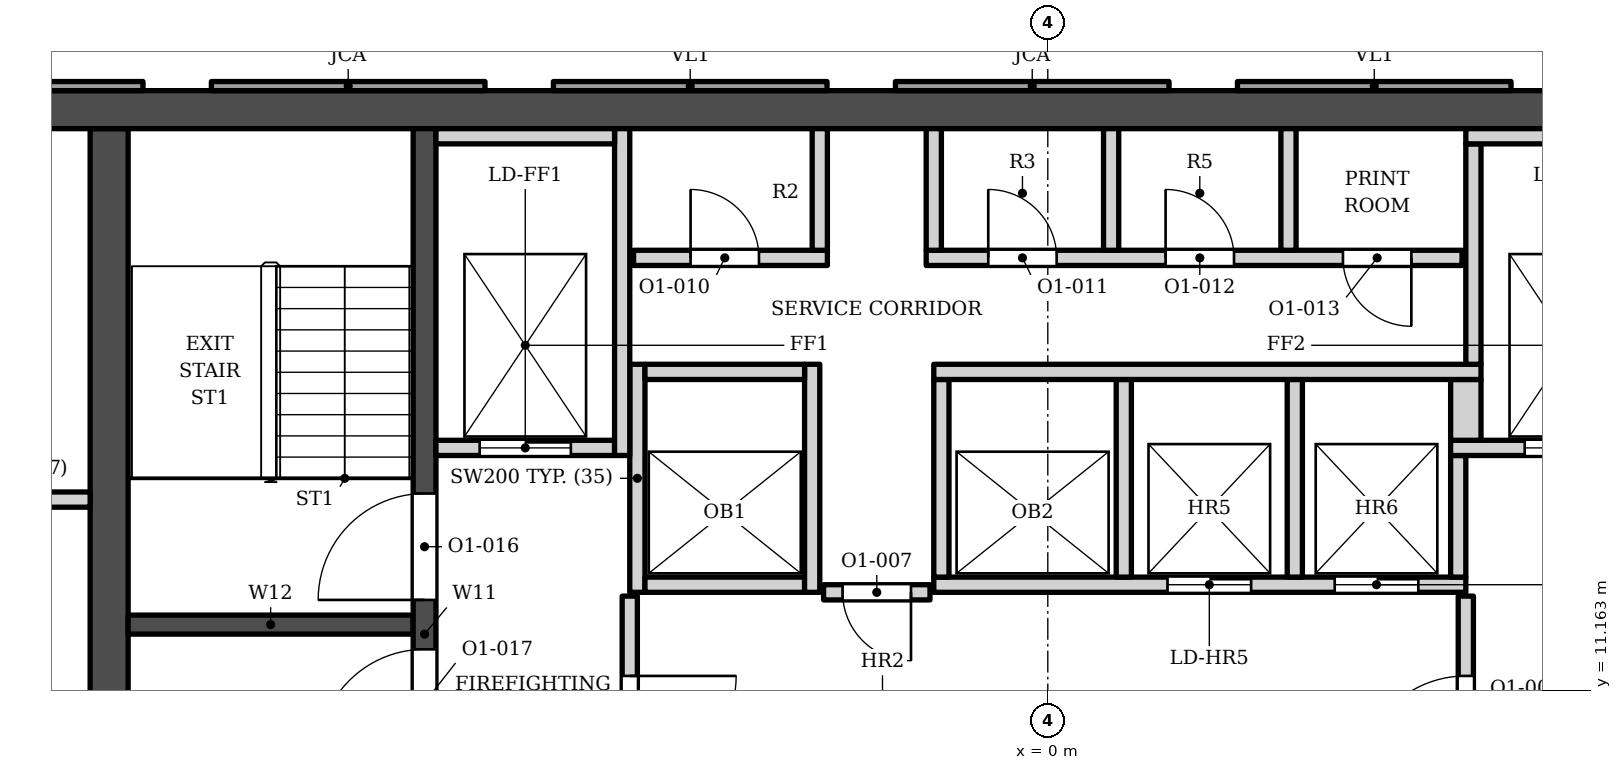
"""IFC4 building model, lengths in metres.
Left out: names, types, materials, properties, quantities, classifications, styles, units other than length and angle.
Written with IfcOpenShell. Run it as: python <this file> out.ifc"""

import sys

from ifc_helpers import new_model, si_unit, direction, frame, frame_2d, origin, place, context, subcontext, project, spatial, polyline, rectangle, outline, extrude, element, fill, save


model = new_model("IFC4")
c1 = context("Model", 3, precision=1e-05, world=origin(), true_north=direction((0.0, 1.0)))
c2 = subcontext(c1, "Body", "Model", "MODEL_VIEW")
j1 = project(units=[si_unit("LENGTHUNIT", "METRE"), si_unit("PLANEANGLEUNIT", "RADIAN")], contexts=[c1])
p1 = place(None, origin())
s1 = spatial("IfcSite", under=j1, at=p1, CompositionType="ELEMENT")
p2 = place(p1, origin())
s2 = spatial("IfcBuilding", under=s1, at=p2, CompositionType="ELEMENT")
p3 = place(p2, frame((0.0, 0.0, 144.6)))
s3 = spatial("IfcBuildingStorey", under=s2, at=p3, CompositionType="ELEMENT", Elevation=144.6)
p4 = place(p3, frame((-15.1, 18.802, 0.0), z_axis=(0.0, 0.0, 1.0), x_axis=(1.0, 0.0, 0.0)))
e1 = element("IfcWall", 1, at=p4, inside=s3, PredefinedType="SHEAR", context=c2, shape_type="SweptSolid", body=[
    extrude(rectangle(XDim=30.2, YDim=0.5, at=frame_2d((15.1, 0.0))), origin(), (0.0, 0.0, 1.0), 3.9),
])
p5 = place(p3, frame((-12.35, 5.253, 0.0), z_axis=(0.0, 0.0, 1.0), x_axis=(0.0, 1.0, 0.0)))
e2 = element("IfcWall", 2, at=p5, inside=s3, PredefinedType="SHEAR", context=c2, shape_type="SweptSolid", body=[
    extrude(rectangle(XDim=13.3, YDim=0.5, at=frame_2d((6.65, 0.0))), origin(), (0.0, 0.0, 1.0), 3.9),
])
p6 = place(p3, frame((-8.2, 5.253, 0.0), z_axis=(0.0, 0.0, 1.0), x_axis=(0.0, 1.0, 0.0)))
e3 = element("IfcWall", 3, at=p6, inside=s3, PredefinedType="SHEAR", context=c2, shape_type="SweptSolid", body=[
    extrude(rectangle(XDim=13.3, YDim=0.3, at=frame_2d((6.65, 0.0))), origin(), (0.0, 0.0, 1.0), 3.9),
])
p7 = place(p6, frame((7.1, 0.0, 0.0)))
e4 = element("IfcOpeningElement", 4, at=p7, cuts=e3, PredefinedType="OPENING", context=c2, shape_type="SweptSolid", body=[
    extrude(rectangle(XDim=1.4, YDim=2.1, at=frame_2d((0.7, 1.05))), frame((0.0, 0.16, 0.0), z_axis=(0.0, -1.0, 0.0), x_axis=(1.0, 0.0, 0.0)), (0.0, 0.0, 1.0), 0.32),
])
p8 = place(p6, frame((5.05, 0.0, 0.0)))
e5 = element("IfcOpeningElement", 5, at=p8, cuts=e3, PredefinedType="OPENING", context=c2, shape_type="SweptSolid", body=[
    extrude(rectangle(XDim=1.4, YDim=2.1, at=frame_2d((0.7, 1.05))), frame((0.0, 0.16, 0.0), z_axis=(0.0, -1.0, 0.0), x_axis=(1.0, 0.0, 0.0)), (0.0, 0.0, 1.0), 0.32),
])
p9 = place(p3, frame((-12.1, 12.028, 0.0), z_axis=(0.0, 0.0, 1.0), x_axis=(1.0, 0.0, 0.0)))
e6 = element("IfcWall", 6, at=p9, inside=s3, PredefinedType="SHEAR", context=c2, shape_type="SweptSolid", body=[
    extrude(rectangle(XDim=3.75, YDim=0.25, at=frame_2d((1.875, 0.0))), origin(), (0.0, 0.0, 1.0), 3.9),
])
p10 = place(p3, origin())
e7 = element("IfcWall", 7, at=p10, inside=s3, PredefinedType="ELEMENTEDWALL", context=c2, shape_type="SweptSolid", body=[
    extrude(outline(polyline([(2.495, 19.173), (2.495, 19.052), (6.095, 19.052), (6.095, 19.173), (2.495, 19.173)])), origin(), (0.0, 0.0, 1.0), 3.0),
])
p11 = place(p3, origin())
e8 = element("IfcWall", 8, at=p11, inside=s3, PredefinedType="SOLIDWALL", context=c2, shape_type="SweptSolid", body=[
    extrude(outline(polyline([(-2.005, 19.173), (-2.005, 19.052), (1.595, 19.052), (1.595, 19.173), (-2.005, 19.173)])), origin(), (0.0, 0.0, 1.0), 3.0),
])
p12 = place(p3, origin())
e9 = element("IfcWall", 9, at=p12, inside=s3, PredefinedType="ELEMENTEDWALL", context=c2, shape_type="SweptSolid", body=[
    extrude(outline(polyline([(-6.505, 19.173), (-6.505, 19.052), (-2.905, 19.052), (-2.905, 19.173), (-6.505, 19.173)])), origin(), (0.0, 0.0, 1.0), 3.0),
])
p13 = place(p3, origin())
e10 = element("IfcWall", 10, at=p13, inside=s3, PredefinedType="SOLIDWALL", context=c2, shape_type="SweptSolid", body=[
    extrude(outline(polyline([(-11.005, 19.173), (-11.005, 19.052), (-7.405, 19.052), (-7.405, 19.173), (-11.005, 19.173)])), origin(), (0.0, 0.0, 1.0), 3.0),
])
p14 = place(p3, origin())
e11 = element("IfcWall", 11, at=p14, inside=s3, PredefinedType="ELEMENTEDWALL", context=c2, shape_type="SweptSolid", body=[
    extrude(outline(polyline([(-11.905, 19.052), (-11.905, 19.173), (-15.503, 19.173), (-15.503, 19.052), (-11.905, 19.052)])), origin(), (0.0, 0.0, 1.0), 3.0),
])
p15 = place(p3, frame((-5.5, 9.103, 0.0), z_axis=(0.0, 0.0, 1.0), x_axis=(0.0, 1.0, 0.0)))
e12 = element("IfcWall", 12, at=p15, inside=s3, PredefinedType="SOLIDWALL", context=c2, shape_type="SweptSolid", body=[
    extrude(rectangle(XDim=3.3, YDim=0.2, at=frame_2d((1.65, 0.0))), origin(), (0.0, 0.0, 1.0), 3.73),
])
p16 = place(p15, frame((0.85, 0.0, 0.0)))
e13 = element("IfcOpeningElement", 13, at=p16, cuts=e12, PredefinedType="OPENING", context=c2, shape_type="SweptSolid", body=[
    extrude(rectangle(XDim=1.4, YDim=2.1, at=frame_2d((0.7, 1.05))), frame((0.0, 0.11, 0.0), z_axis=(0.0, -1.0, 0.0), x_axis=(1.0, 0.0, 0.0)), (0.0, 0.0, 1.0), 0.22),
])
p17 = place(p3, frame((5.5, 9.103, 0.0), z_axis=(0.0, 0.0, 1.0), x_axis=(0.0, 1.0, 0.0)))
e14 = element("IfcWall", 14, at=p17, inside=s3, PredefinedType="SOLIDWALL", context=c2, shape_type="SweptSolid", body=[
    extrude(rectangle(XDim=3.3, YDim=0.2, at=frame_2d((1.65, 0.0))), origin(), (0.0, 0.0, 1.0), 3.73),
])
p18 = place(p17, frame((0.85, 0.0, 0.0)))
e15 = element("IfcOpeningElement", 15, at=p18, cuts=e14, PredefinedType="OPENING", context=c2, shape_type="SweptSolid", body=[
    extrude(rectangle(XDim=1.4, YDim=2.1, at=frame_2d((0.7, 1.05))), frame((0.0, 0.11, 0.0), z_axis=(0.0, -1.0, 0.0), x_axis=(1.0, 0.0, 0.0)), (0.0, 0.0, 1.0), 0.22),
])
p19 = place(p3, frame((-2.95, 12.453, 0.0), z_axis=(0.0, 0.0, 1.0), x_axis=(1.0, 0.0, 0.0)))
e16 = element("IfcWall", 16, at=p19, inside=s3, PredefinedType="SOLIDWALL", context=c2, shape_type="SweptSolid", body=[
    extrude(rectangle(XDim=1.4, YDim=0.2, at=frame_2d((0.7, 0.0))), origin(), (0.0, 0.0, 1.0), 3.73),
])
p20 = place(p19, frame((0.25, 0.0, 0.0)))
e17 = element("IfcOpeningElement", 17, at=p20, cuts=e16, PredefinedType="OPENING", context=c2, shape_type="SweptSolid", body=[
    extrude(rectangle(XDim=0.9, YDim=2.1, at=frame_2d((0.45, 1.05))), frame((0.0, 0.11, 0.0), z_axis=(0.0, -1.0, 0.0), x_axis=(1.0, 0.0, 0.0)), (0.0, 0.0, 1.0), 0.22),
])
p21 = place(p3, frame((-5.4, 12.453, 0.0), z_axis=(0.0, 0.0, 1.0), x_axis=(0.0, 1.0, 0.0)))
e18 = element("IfcWall", 18, at=p21, inside=s3, PredefinedType="SOLIDWALL", context=c2, shape_type="SweptSolid", body=[
    extrude(rectangle(XDim=3.0, YDim=0.2, at=frame_2d((1.5, 0.0))), origin(), (0.0, 0.0, 1.0), 3.73),
])
p22 = place(p3, frame((-5.3, 12.552, 0.0), z_axis=(0.0, 0.0, 1.0), x_axis=(1.0, 0.0, 0.0)))
e19 = element("IfcWall", 19, at=p22, inside=s3, PredefinedType="SOLIDWALL", context=c2, shape_type="SweptSolid", body=[
    extrude(rectangle(XDim=2.1, YDim=0.2, at=frame_2d((1.05, 0.0))), origin(), (0.0, 0.0, 1.0), 3.73),
])
p23 = place(p3, frame((-3.1, 12.453, 0.0), z_axis=(0.0, 0.0, 1.0), x_axis=(0.0, 1.0, 0.0)))
e20 = element("IfcWall", 20, at=p23, inside=s3, PredefinedType="SOLIDWALL", context=c2, shape_type="SweptSolid", body=[
    extrude(rectangle(XDim=3.0, YDim=0.2, at=frame_2d((1.5, 0.0))), origin(), (0.0, 0.0, 1.0), 3.73),
])
p24 = place(p3, frame((-1.5, 12.552, 0.0), z_axis=(0.0, 0.0, 1.0), x_axis=(1.0, 0.0, 0.0)))
e21 = element("IfcWall", 21, at=p24, inside=s3, PredefinedType="SOLIDWALL", context=c2, shape_type="SweptSolid", body=[
    extrude(rectangle(XDim=7.0, YDim=0.2, at=frame_2d((3.5, 0.0))), origin(), (0.0, 0.0, 1.0), 3.73),
])
p25 = place(p24, frame((3.075, 0.0, 0.0)))
e22 = element("IfcOpeningElement", 22, at=p25, cuts=e21, PredefinedType="OPENING", context=c2, shape_type="SweptSolid", body=[
    extrude(rectangle(XDim=1.1, YDim=2.1, at=frame_2d((0.55, 1.05))), frame((0.0, 0.11, 0.0), z_axis=(0.0, -1.0, 0.0), x_axis=(1.0, 0.0, 0.0)), (0.0, 0.0, 1.0), 0.22),
])
p26 = place(p24, frame((5.275, 0.0, 0.0)))
e23 = element("IfcOpeningElement", 23, at=p26, cuts=e21, PredefinedType="OPENING", context=c2, shape_type="SweptSolid", body=[
    extrude(rectangle(XDim=1.1, YDim=2.1, at=frame_2d((0.55, 1.05))), frame((0.0, 0.11, 0.0), z_axis=(0.0, -1.0, 0.0), x_axis=(1.0, 0.0, 0.0)), (0.0, 0.0, 1.0), 0.22),
])
for number, where, z_axis, x_axis in (
    (24, (-1.4, 12.653, 0.0), (0.0, 0.0, 1.0), (0.0, 1.0, 0.0)),
    (25, (1.0, 12.653, 0.0), (0.0, 0.0, 1.0), (0.0, 1.0, 0.0)),
    (26, (3.25, 12.653, 0.0), (0.0, 0.0, 1.0), (0.0, 1.0, 0.0)),
):
    element("IfcWall", number, at=place(p3, frame(where, z_axis=z_axis, x_axis=x_axis)), inside=s3, PredefinedType="SOLIDWALL", context=c2, shape_type="SweptSolid", body=[
        extrude(rectangle(XDim=2.6, YDim=0.2, at=frame_2d((1.3, 0.0))), origin(), (0.0, 0.0, 1.0), 3.73),
    ])
p27 = place(p3, frame((5.4, 12.653, 0.0), z_axis=(0.0, 0.0, 1.0), x_axis=(0.0, 1.0, 0.0)))
e27 = element("IfcWall", 27, at=p27, inside=s3, PredefinedType="SOLIDWALL", context=c2, shape_type="SweptSolid", body=[
    extrude(rectangle(XDim=1.6, YDim=0.2, at=frame_2d((0.8, 0.0))), origin(), (0.0, 0.0, 1.0), 3.73),
])
p28 = place(p3, frame((-15.1, 13.673, 0.0), z_axis=(0.0, 0.0, 1.0), x_axis=(1.0, 0.0, 0.0)))
e28 = element("IfcWall", 28, at=p28, inside=s3, PredefinedType="PARTITIONING", context=c2, shape_type="SweptSolid", body=[
    extrude(rectangle(XDim=2.5, YDim=0.2, at=frame_2d((1.25, 0.0))), origin(), (0.0, 0.0, 1.0), 3.73),
])
p29 = place(p3, frame((-8.05, 14.353, 0.0), z_axis=(0.0, 0.0, 1.0), x_axis=(1.0, 0.0, 0.0)))
e29 = element("IfcWall", 29, at=p29, inside=s3, PredefinedType="SOLIDWALL", context=c2, shape_type="SweptSolid", body=[
    extrude(rectangle(XDim=2.35, YDim=0.2, at=frame_2d((1.175, 0.0))), origin(), (0.0, 0.0, 1.0), 3.73),
])
p30 = place(p29, frame((0.575, 0.0, 0.0)))
e30 = element("IfcOpeningElement", 30, at=p30, cuts=e29, PredefinedType="OPENING", context=c2, shape_type="SweptSolid", body=[
    extrude(rectangle(XDim=1.2, YDim=2.1, at=frame_2d((0.6, 1.05))), frame((0.0, 0.11, 0.0), z_axis=(0.0, -1.0, 0.0), x_axis=(1.0, 0.0, 0.0)), (0.0, 0.0, 1.0), 0.22),
])
p31 = place(p3, frame((-5.6, 14.253, 0.0), z_axis=(0.0, 0.0, 1.0), x_axis=(0.0, 1.0, 0.0)))
e31 = element("IfcWall", 31, at=p31, inside=s3, PredefinedType="SOLIDWALL", context=c2, shape_type="SweptSolid", body=[
    extrude(rectangle(XDim=4.3, YDim=0.2, at=frame_2d((2.15, 0.0))), origin(), (0.0, 0.0, 1.0), 3.73),
])
p32 = place(p3, frame((5.3, 14.353, 0.0), z_axis=(0.0, 0.0, 1.0), x_axis=(1.0, 0.0, 0.0)))
e32 = element("IfcWall", 32, at=p32, inside=s3, PredefinedType="SOLIDWALL", context=c2, shape_type="SweptSolid", body=[
    extrude(rectangle(XDim=2.75, YDim=0.2, at=frame_2d((1.375, 0.0))), origin(), (0.0, 0.0, 1.0), 3.73),
])
p33 = place(p32, frame((0.975, 0.0, 0.0)))
e33 = element("IfcOpeningElement", 33, at=p33, cuts=e32, PredefinedType="OPENING", context=c2, shape_type="SweptSolid", body=[
    extrude(rectangle(XDim=1.2, YDim=2.1, at=frame_2d((0.6, 1.05))), frame((0.0, 0.11, 0.0), z_axis=(0.0, -1.0, 0.0), x_axis=(1.0, 0.0, 0.0)), (0.0, 0.0, 1.0), 0.22),
])
p34 = place(p3, frame((5.5, 14.453, 0.0), z_axis=(0.0, 0.0, 1.0), x_axis=(0.0, 1.0, 0.0)))
e34 = element("IfcWall", 34, at=p34, inside=s3, PredefinedType="SOLIDWALL", context=c2, shape_type="SweptSolid", body=[
    extrude(rectangle(XDim=0.8, YDim=0.4, at=frame_2d((0.4, 0.0))), origin(), (0.0, 0.0, 1.0), 3.73),
])
p35 = place(p3, frame((-5.3, 15.353, 0.0), z_axis=(0.0, 0.0, 1.0), x_axis=(1.0, 0.0, 0.0)))
e35 = element("IfcWall", 35, at=p35, inside=s3, PredefinedType="SOLIDWALL", context=c2, shape_type="SweptSolid", body=[
    extrude(rectangle(XDim=2.1, YDim=0.2, at=frame_2d((1.05, 0.0))), origin(), (0.0, 0.0, 1.0), 3.73),
])
p36 = place(p3, frame((-1.5, 15.353, 0.0), z_axis=(0.0, 0.0, 1.0), x_axis=(1.0, 0.0, 0.0)))
e36 = element("IfcWall", 36, at=p36, inside=s3, PredefinedType="SOLIDWALL", context=c2, shape_type="SweptSolid", body=[
    extrude(rectangle(XDim=7.2, YDim=0.2, at=frame_2d((3.6, 0.0))), origin(), (0.0, 0.0, 1.0), 3.73),
])
p37 = place(p3, frame((5.6, 15.453, 0.0), z_axis=(0.0, 0.0, 1.0), x_axis=(0.0, 1.0, 0.0)))
e37 = element("IfcWall", 37, at=p37, inside=s3, PredefinedType="SOLIDWALL", context=c2, shape_type="SweptSolid", body=[
    extrude(rectangle(XDim=2.9, YDim=0.2, at=frame_2d((1.45, 0.0))), origin(), (0.0, 0.0, 1.0), 3.73),
])
p38 = place(p3, frame((-5.45, 16.853, 0.0), z_axis=(0.0, 0.0, 1.0), x_axis=(1.0, 0.0, 0.0)))
e38 = element("IfcWall", 38, at=p38, inside=s3, PredefinedType="SOLIDWALL", context=c2, shape_type="SweptSolid", body=[
    extrude(rectangle(XDim=2.55, YDim=0.2, at=frame_2d((1.275, 0.0))), origin(), (0.0, 0.0, 1.0), 3.73),
])
p39 = place(p38, frame((0.75, 0.0, 0.0)))
e39 = element("IfcOpeningElement", 39, at=p39, cuts=e38, PredefinedType="OPENING", context=c2, shape_type="SweptSolid", body=[
    extrude(rectangle(XDim=0.9, YDim=2.1, at=frame_2d((0.45, 1.05))), frame((0.0, 0.11, 0.0), z_axis=(0.0, -1.0, 0.0), x_axis=(1.0, 0.0, 0.0)), (0.0, 0.0, 1.0), 0.22),
])
p40 = place(p3, frame((-1.6, 16.853, 0.0), z_axis=(0.0, 0.0, 1.0), x_axis=(1.0, 0.0, 0.0)))
e40 = element("IfcWall", 40, at=p40, inside=s3, PredefinedType="SOLIDWALL", context=c2, shape_type="SweptSolid", body=[
    extrude(rectangle(XDim=7.05, YDim=0.2, at=frame_2d((3.525, 0.0))), origin(), (0.0, 0.0, 1.0), 3.73),
])
p41 = place(p40, frame((0.817, 0.0, 0.0)))
e41 = element("IfcOpeningElement", 41, at=p41, cuts=e40, PredefinedType="OPENING", context=c2, shape_type="SweptSolid", body=[
    extrude(rectangle(XDim=0.9, YDim=2.1, at=frame_2d((0.45, 1.05))), frame((0.0, 0.11, 0.0), z_axis=(0.0, -1.0, 0.0), x_axis=(1.0, 0.0, 0.0)), (0.0, 0.0, 1.0), 0.22),
])
p42 = place(p40, frame((3.15, 0.0, 0.0)))
e42 = element("IfcOpeningElement", 42, at=p42, cuts=e40, PredefinedType="OPENING", context=c2, shape_type="SweptSolid", body=[
    extrude(rectangle(XDim=0.9, YDim=2.1, at=frame_2d((0.45, 1.05))), frame((0.0, 0.11, 0.0), z_axis=(0.0, -1.0, 0.0), x_axis=(1.0, 0.0, 0.0)), (0.0, 0.0, 1.0), 0.22),
])
p43 = place(p40, frame((5.483, 0.0, 0.0)))
e43 = element("IfcOpeningElement", 43, at=p43, cuts=e40, PredefinedType="OPENING", context=c2, shape_type="SweptSolid", body=[
    extrude(rectangle(XDim=0.9, YDim=2.1, at=frame_2d((0.45, 1.05))), frame((0.0, 0.11, 0.0), z_axis=(0.0, -1.0, 0.0), x_axis=(1.0, 0.0, 0.0)), (0.0, 0.0, 1.0), 0.22),
])
for number, where, z_axis, x_axis in (
    (44, (-3.0, 16.953, 0.0), (0.0, 0.0, 1.0), (0.0, 1.0, 0.0)),
    (45, (-1.5, 16.953, 0.0), (0.0, 0.0, 1.0), (0.0, 1.0, 0.0)),
    (46, (0.833, 16.953, 0.0), (0.0, 0.0, 1.0), (0.0, 1.0, 0.0)),
    (47, (3.167, 16.953, 0.0), (0.0, 0.0, 1.0), (0.0, 1.0, 0.0)),
):
    element("IfcWall", number, at=place(p3, frame(where, z_axis=z_axis, x_axis=x_axis)), inside=s3, PredefinedType="PARTITIONING", context=c2, shape_type="SweptSolid", body=[
        extrude(rectangle(XDim=1.6, YDim=0.2, at=frame_2d((0.8, 0.0))), origin(), (0.0, 0.0, 1.0), 3.73),
    ])
p44 = place(p3, frame((-8.05, 18.453, 0.0), z_axis=(0.0, 0.0, 1.0), x_axis=(1.0, 0.0, 0.0)))
e48 = element("IfcWall", 48, at=p44, inside=s3, PredefinedType="SOLIDWALL", context=c2, shape_type="SweptSolid", body=[
    extrude(rectangle(XDim=2.35, YDim=0.2, at=frame_2d((1.175, 0.0))), origin(), (0.0, 0.0, 1.0), 3.73),
])
p45 = place(p3, frame((5.5, 18.453, 0.0), z_axis=(0.0, 0.0, 1.0), x_axis=(1.0, 0.0, 0.0)))
e49 = element("IfcWall", 49, at=p45, inside=s3, PredefinedType="SOLIDWALL", context=c2, shape_type="SweptSolid", body=[
    extrude(rectangle(XDim=2.55, YDim=0.2, at=frame_2d((1.275, 0.0))), origin(), (0.0, 0.0, 1.0), 3.73),
])
p46 = place(p25, origin())
e50 = element("IfcDoor", 50, at=p46, inside=s3, OperationType="DOUBLE_DOOR_SLIDING", PredefinedType="DOOR", context=c2, shape_type="SweptSolid", body=[
    extrude(rectangle(XDim=1.1, YDim=2.1, at=frame_2d((0.55, 1.05))), frame((0.0, 0.025, 0.0), z_axis=(0.0, -1.0, 0.0), x_axis=(1.0, 0.0, 0.0)), (0.0, 0.0, 1.0), 0.05),
])
fill(e22, e50)
p47 = place(p26, origin())
e51 = element("IfcDoor", 51, at=p47, inside=s3, OperationType="DOUBLE_DOOR_SLIDING", PredefinedType="DOOR", context=c2, shape_type="SweptSolid", body=[
    extrude(rectangle(XDim=1.1, YDim=2.1, at=frame_2d((0.55, 1.05))), frame((0.0, 0.025, 0.0), z_axis=(0.0, -1.0, 0.0), x_axis=(1.0, 0.0, 0.0)), (0.0, 0.0, 1.0), 0.05),
])
fill(e23, e51)
p48 = place(p30, origin())
e52 = element("IfcDoor", 52, at=p48, inside=s3, OperationType="DOUBLE_DOOR_SLIDING", PredefinedType="DOOR", context=c2, shape_type="SweptSolid", body=[
    extrude(rectangle(XDim=1.2, YDim=2.1, at=frame_2d((0.6, 1.05))), frame((0.0, 0.025, 0.0), z_axis=(0.0, -1.0, 0.0), x_axis=(1.0, 0.0, 0.0)), (0.0, 0.0, 1.0), 0.05),
])
fill(e30, e52)
p49 = place(p33, origin())
e53 = element("IfcDoor", 53, at=p49, inside=s3, OperationType="DOUBLE_DOOR_SLIDING", PredefinedType="DOOR", context=c2, shape_type="SweptSolid", body=[
    extrude(rectangle(XDim=1.2, YDim=2.1, at=frame_2d((0.6, 1.05))), frame((0.0, 0.025, 0.0), z_axis=(0.0, -1.0, 0.0), x_axis=(1.0, 0.0, 0.0)), (0.0, 0.0, 1.0), 0.05),
])
fill(e33, e53)
p50 = place(p7, origin())
e54 = element("IfcDoor", 54, at=p50, inside=s3, OperationType="SINGLE_SWING_LEFT", PredefinedType="DOOR", context=c2, shape_type="SweptSolid", body=[
    extrude(rectangle(XDim=1.4, YDim=2.1, at=frame_2d((0.7, 1.05))), frame((0.0, 0.025, 0.0), z_axis=(0.0, -1.0, 0.0), x_axis=(1.0, 0.0, 0.0)), (0.0, 0.0, 1.0), 0.05),
])
fill(e4, e54)
p51 = place(p8, origin())
e55 = element("IfcDoor", 55, at=p51, inside=s3, OperationType="SINGLE_SWING_LEFT", PredefinedType="DOOR", context=c2, shape_type="SweptSolid", body=[
    extrude(rectangle(XDim=1.4, YDim=2.1, at=frame_2d((0.7, 1.05))), frame((0.0, 0.025, 0.0), z_axis=(0.0, -1.0, 0.0), x_axis=(1.0, 0.0, 0.0)), (0.0, 0.0, 1.0), 0.05),
])
fill(e5, e55)
p52 = place(p20, origin())
e56 = element("IfcDoor", 56, at=p52, inside=s3, OperationType="SINGLE_SWING_RIGHT", PredefinedType="DOOR", context=c2, shape_type="SweptSolid", body=[
    extrude(rectangle(XDim=0.9, YDim=2.1, at=frame_2d((0.45, 1.05))), frame((0.0, 0.025, 0.0), z_axis=(0.0, -1.0, 0.0), x_axis=(1.0, 0.0, 0.0)), (0.0, 0.0, 1.0), 0.05),
])
fill(e17, e56)
p53 = place(p16, origin())
e57 = element("IfcDoor", 57, at=p53, inside=s3, OperationType="SINGLE_SWING_RIGHT", PredefinedType="DOOR", context=c2, shape_type="SweptSolid", body=[
    extrude(rectangle(XDim=1.4, YDim=2.1, at=frame_2d((0.7, 1.05))), frame((0.0, 0.025, 0.0), z_axis=(0.0, -1.0, 0.0), x_axis=(1.0, 0.0, 0.0)), (0.0, 0.0, 1.0), 0.05),
])
fill(e13, e57)
p54 = place(p18, origin())
e58 = element("IfcDoor", 58, at=p54, inside=s3, OperationType="SINGLE_SWING_LEFT", PredefinedType="DOOR", context=c2, shape_type="SweptSolid", body=[
    extrude(rectangle(XDim=1.4, YDim=2.1, at=frame_2d((0.7, 1.05))), frame((0.0, 0.025, 0.0), z_axis=(0.0, -1.0, 0.0), x_axis=(1.0, 0.0, 0.0)), (0.0, 0.0, 1.0), 0.05),
])
fill(e15, e58)
p55 = place(p39, origin())
e59 = element("IfcDoor", 59, at=p55, inside=s3, OperationType="SINGLE_SWING_LEFT", PredefinedType="DOOR", context=c2, shape_type="SweptSolid", body=[
    extrude(rectangle(XDim=0.9, YDim=2.1, at=frame_2d((0.45, 1.05))), frame((0.0, 0.025, 0.0), z_axis=(0.0, -1.0, 0.0), x_axis=(1.0, 0.0, 0.0)), (0.0, 0.0, 1.0), 0.05),
])
fill(e39, e59)
p56 = place(p41, origin())
e60 = element("IfcDoor", 60, at=p56, inside=s3, OperationType="SINGLE_SWING_LEFT", PredefinedType="DOOR", context=c2, shape_type="SweptSolid", body=[
    extrude(rectangle(XDim=0.9, YDim=2.1, at=frame_2d((0.45, 1.05))), frame((0.0, 0.025, 0.0), z_axis=(0.0, -1.0, 0.0), x_axis=(1.0, 0.0, 0.0)), (0.0, 0.0, 1.0), 0.05),
])
fill(e41, e60)
p57 = place(p42, origin())
e61 = element("IfcDoor", 61, at=p57, inside=s3, OperationType="SINGLE_SWING_LEFT", PredefinedType="DOOR", context=c2, shape_type="SweptSolid", body=[
    extrude(rectangle(XDim=0.9, YDim=2.1, at=frame_2d((0.45, 1.05))), frame((0.0, 0.025, 0.0), z_axis=(0.0, -1.0, 0.0), x_axis=(1.0, 0.0, 0.0)), (0.0, 0.0, 1.0), 0.05),
])
fill(e42, e61)
p58 = place(p43, origin())
e62 = element("IfcDoor", 62, at=p58, inside=s3, OperationType="SINGLE_SWING_RIGHT", PredefinedType="DOOR", context=c2, shape_type="SweptSolid", body=[
    extrude(rectangle(XDim=0.9, YDim=2.1, at=frame_2d((0.45, 1.05))), frame((0.0, 0.025, 0.0), z_axis=(0.0, -1.0, 0.0), x_axis=(1.0, 0.0, 0.0)), (0.0, 0.0, 1.0), 0.05),
])
fill(e43, e62)
save(model, sys.argv[1])
